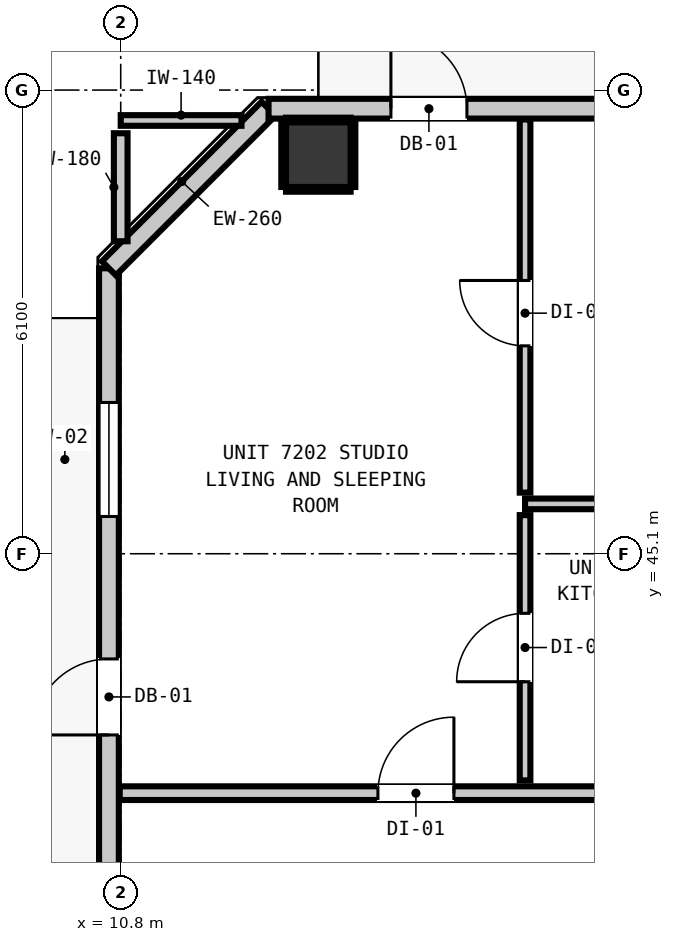
"""IFC4 building model, lengths in metres.
Left out: names, types, materials, properties, quantities, classifications, styles, units other than length and angle.
Written with IfcOpenShell. Run it as: python <this file> out.ifc"""

import sys

from ifc_helpers import new_model, si_unit, direction, frame, frame_2d, origin, origin_2d, place, context, subcontext, project, spatial, rectangle, extrude, element, fill, save


model = new_model("IFC4")
c1 = context("Model", 3, precision=1e-05, world=origin(), true_north=direction((0.0, 1.0)))
c2 = subcontext(c1, "Body", "Model", "MODEL_VIEW")
j1 = project(units=[si_unit("LENGTHUNIT", "METRE"), si_unit("PLANEANGLEUNIT", "RADIAN")], contexts=[c1])
p1 = place(None, origin())
s1 = spatial("IfcSite", under=j1, at=p1, CompositionType="ELEMENT")
p2 = place(p1, origin())
s2 = spatial("IfcBuilding", under=s1, at=p2, CompositionType="ELEMENT")
p3 = place(p2, frame((0.0, 0.0, 247.88)))
s3 = spatial("IfcBuildingStorey", under=s2, at=p3, CompositionType="ELEMENT", Elevation=247.88)
p4 = place(p3, frame((13.4, 50.35, 0.0), z_axis=(0.0, 0.0, 1.0), x_axis=(1.0, 0.0, 0.0)))
e1 = element("IfcColumn", 1, at=p4, inside=s3, PredefinedType="COLUMN", context=c2, shape_type="SweptSolid", body=[
    extrude(rectangle(XDim=0.85, YDim=0.85, at=origin_2d()), origin(), (0.0, 0.0, 1.0), 2.9),
])
p5 = place(p3, frame((10.645, 18.545, 0.0), z_axis=(0.0, 0.0, 1.0), x_axis=(0.0, 1.0, 0.0)))
e2 = element("IfcWall", 2, at=p5, inside=s3, PredefinedType="STANDARD", context=c2, shape_type="SweptSolid", body=[
    extrude(rectangle(XDim=30.31, YDim=0.26, at=frame_2d((15.155, 0.0))), origin(), (0.0, 0.0, 1.0), 2.9),
])
p6 = place(p5, frame((24.171, 0.0, 0.0)))
e3 = element("IfcOpeningElement", 3, at=p6, cuts=e2, PredefinedType="OPENING", context=c2, shape_type="SweptSolid", body=[
    extrude(rectangle(XDim=1.0, YDim=2.15, at=frame_2d((0.5, 1.075))), frame((0.0, 0.14, 0.0), z_axis=(0.0, -1.0, 0.0), x_axis=(1.0, 0.0, 0.0)), (0.0, 0.0, 1.0), 0.28),
])
p7 = place(p5, frame((27.045, 0.0, 0.85)))
e4 = element("IfcOpeningElement", 4, at=p7, cuts=e2, PredefinedType="OPENING", context=c2, shape_type="SweptSolid", body=[
    extrude(rectangle(XDim=1.5, YDim=1.8, at=frame_2d((0.75, 0.9))), frame((0.0, 0.14, 0.0), z_axis=(0.0, -1.0, 0.0), x_axis=(1.0, 0.0, 0.0)), (0.0, 0.0, 1.0), 0.28),
])
p8 = place(p3, frame((10.645, 48.855, 0.0), z_axis=(0.0, 0.0, 1.0), x_axis=(0.707106781187, 0.707106781187, 0.0)))
e5 = element("IfcWall", 5, at=p8, inside=s3, PredefinedType="STANDARD", context=c2, shape_type="SweptSolid", body=[
    extrude(rectangle(XDim=2.97, YDim=0.26, at=frame_2d((1.485, 0.0))), origin(), (0.0, 0.0, 1.0), 2.9),
])
p9 = place(p3, frame((12.745, 50.955, 0.0), z_axis=(0.0, 0.0, 1.0), x_axis=(1.0, 0.0, 0.0)))
e6 = element("IfcWall", 6, at=p9, inside=s3, PredefinedType="STANDARD", context=c2, shape_type="SweptSolid", body=[
    extrude(rectangle(XDim=32.71, YDim=0.26, at=frame_2d((16.355, 0.0))), origin(), (0.0, 0.0, 1.0), 2.9),
])
p10 = place(p9, frame((1.61, 0.0, 0.0)))
e7 = element("IfcOpeningElement", 7, at=p10, cuts=e6, PredefinedType="OPENING", context=c2, shape_type="SweptSolid", body=[
    extrude(rectangle(XDim=1.0, YDim=2.15, at=frame_2d((0.5, 1.075))), frame((0.0, 0.14, 0.0), z_axis=(0.0, -1.0, 0.0), x_axis=(1.0, 0.0, 0.0)), (0.0, 0.0, 1.0), 0.28),
])
p11 = place(p9, frame((9.328, 0.0, 0.85)))
e8 = element("IfcOpeningElement", 8, at=p11, cuts=e6, PredefinedType="OPENING", context=c2, shape_type="SweptSolid", body=[
    extrude(rectangle(XDim=1.5, YDim=1.8, at=frame_2d((0.75, 0.9))), frame((0.0, 0.14, 0.0), z_axis=(0.0, -1.0, 0.0), x_axis=(1.0, 0.0, 0.0)), (0.0, 0.0, 1.0), 0.28),
])
p12 = place(p9, frame((17.29, 0.0, 0.85)))
e9 = element("IfcOpeningElement", 9, at=p12, cuts=e6, PredefinedType="OPENING", context=c2, shape_type="SweptSolid", body=[
    extrude(rectangle(XDim=1.5, YDim=1.8, at=frame_2d((0.75, 0.9))), frame((0.0, 0.14, 0.0), z_axis=(0.0, -1.0, 0.0), x_axis=(1.0, 0.0, 0.0)), (0.0, 0.0, 1.0), 0.28),
])
p13 = place(p9, frame((27.117, 0.0, 0.85)))
e10 = element("IfcOpeningElement", 10, at=p13, cuts=e6, PredefinedType="OPENING", context=c2, shape_type="SweptSolid", body=[
    extrude(rectangle(XDim=1.5, YDim=1.8, at=frame_2d((0.75, 0.9))), frame((0.0, 0.14, 0.0), z_axis=(0.0, -1.0, 0.0), x_axis=(1.0, 0.0, 0.0)), (0.0, 0.0, 1.0), 0.28),
])
p14 = place(p3, frame((10.787, 41.95, 0.0), z_axis=(0.0, 0.0, 1.0), x_axis=(1.0, 0.0, 0.0)))
e11 = element("IfcWall", 11, at=p14, inside=s3, PredefinedType="PARTITIONING", context=c2, shape_type="SweptSolid", body=[
    extrude(rectangle(XDim=36.626, YDim=0.18, at=frame_2d((18.313, 0.0))), origin(), (0.0, 0.0, 1.0), 2.9),
])
p15 = place(p14, frame((3.397, 0.0, 0.0)))
e12 = element("IfcOpeningElement", 12, at=p15, cuts=e11, PredefinedType="OPENING", context=c2, shape_type="SweptSolid", body=[
    extrude(rectangle(XDim=1.0, YDim=2.15, at=frame_2d((0.5, 1.075))), frame((0.0, 0.1, 0.0), z_axis=(0.0, -1.0, 0.0), x_axis=(1.0, 0.0, 0.0)), (0.0, 0.0, 1.0), 0.2),
])
p16 = place(p14, frame((10.773, 0.0, 0.0)))
e13 = element("IfcOpeningElement", 13, at=p16, cuts=e11, PredefinedType="OPENING", context=c2, shape_type="SweptSolid", body=[
    extrude(rectangle(XDim=1.0, YDim=2.15, at=frame_2d((0.5, 1.075))), frame((0.0, 0.1, 0.0), z_axis=(0.0, -1.0, 0.0), x_axis=(1.0, 0.0, 0.0)), (0.0, 0.0, 1.0), 0.2),
])
p17 = place(p14, frame((19.136, 0.0, 0.0)))
e14 = element("IfcOpeningElement", 14, at=p17, cuts=e11, PredefinedType="OPENING", context=c2, shape_type="SweptSolid", body=[
    extrude(rectangle(XDim=1.0, YDim=2.15, at=frame_2d((0.5, 1.075))), frame((0.0, 0.1, 0.0), z_axis=(0.0, -1.0, 0.0), x_axis=(1.0, 0.0, 0.0)), (0.0, 0.0, 1.0), 0.2),
])
p18 = place(p14, frame((28.323, 0.0, 0.0)))
e15 = element("IfcOpeningElement", 15, at=p18, cuts=e11, PredefinedType="OPENING", context=c2, shape_type="SweptSolid", body=[
    extrude(rectangle(XDim=1.0, YDim=2.15, at=frame_2d((0.5, 1.075))), frame((0.0, 0.1, 0.0), z_axis=(0.0, -1.0, 0.0), x_axis=(1.0, 0.0, 0.0)), (0.0, 0.0, 1.0), 0.2),
])
p19 = place(p3, frame((16.12, 45.756, 0.0), z_axis=(0.0, 0.0, 1.0), x_axis=(1.0, 0.0, 0.0)))
e16 = element("IfcWall", 16, at=p19, inside=s3, PredefinedType="PARTITIONING", context=c2, shape_type="SweptSolid", body=[
    extrude(rectangle(XDim=3.0, YDim=0.14, at=frame_2d((1.5, 0.0))), origin(), (0.0, 0.0, 1.0), 2.9),
])
p20 = place(p3, frame((10.8, 50.8, 0.0), z_axis=(0.0, 0.0, 1.0), x_axis=(1.0, 0.0, 0.0)))
e17 = element("IfcWall", 17, at=p20, inside=s3, PredefinedType="PARTITIONING", context=c2, shape_type="SweptSolid", body=[
    extrude(rectangle(XDim=1.589, YDim=0.14, at=frame_2d((0.794, 0.0))), origin(), (0.0, 0.0, 1.0), 2.9),
])
p21 = place(p3, frame((10.8, 49.211, 0.0), z_axis=(0.0, 0.0, 1.0), x_axis=(0.0, 1.0, 0.0)))
e18 = element("IfcWall", 18, at=p21, inside=s3, PredefinedType="PARTITIONING", context=c2, shape_type="SweptSolid", body=[
    extrude(rectangle(XDim=1.421, YDim=0.18, at=frame_2d((0.71, 0.0))), origin(), (0.0, 0.0, 1.0), 2.9),
])
p22 = place(p3, frame((16.12, 42.118, 0.0), z_axis=(0.0, 0.0, 1.0), x_axis=(0.0, 1.0, 0.0)))
e19 = element("IfcWall", 19, at=p22, inside=s3, PredefinedType="PARTITIONING", context=c2, shape_type="SweptSolid", body=[
    extrude(rectangle(XDim=3.49, YDim=0.14, at=frame_2d((1.745, 0.0))), origin(), (0.0, 0.0, 1.0), 2.9),
])
p23 = place(p22, frame((1.298, 0.0, 0.0)))
e20 = element("IfcOpeningElement", 20, at=p23, cuts=e19, PredefinedType="OPENING", context=c2, shape_type="SweptSolid", body=[
    extrude(rectangle(XDim=0.9, YDim=2.1, at=frame_2d((0.45, 1.05))), frame((0.0, 0.08, 0.0), z_axis=(0.0, -1.0, 0.0), x_axis=(1.0, 0.0, 0.0)), (0.0, 0.0, 1.0), 0.16),
])
p24 = place(p3, frame((16.12, 45.904, 0.0), z_axis=(0.0, 0.0, 1.0), x_axis=(0.0, 1.0, 0.0)))
e21 = element("IfcWall", 21, at=p24, inside=s3, PredefinedType="PARTITIONING", context=c2, shape_type="SweptSolid", body=[
    extrude(rectangle(XDim=4.909, YDim=0.14, at=frame_2d((2.455, 0.0))), origin(), (0.0, 0.0, 1.0), 2.9),
])
p25 = place(p24, frame((1.931, 0.0, 0.0)))
e22 = element("IfcOpeningElement", 22, at=p25, cuts=e21, PredefinedType="OPENING", context=c2, shape_type="SweptSolid", body=[
    extrude(rectangle(XDim=0.86, YDim=2.02, at=frame_2d((0.43, 1.01))), frame((0.0, 0.08, 0.0), z_axis=(0.0, -1.0, 0.0), x_axis=(1.0, 0.0, 0.0)), (0.0, 0.0, 1.0), 0.16),
])
for number, where, z_axis, x_axis in (
    (23, (12.975, 49.893, 0.0), (0.0, 0.0, 1.0), (1.0, 0.0, 0.0)),
    (24, (12.975, 50.807, 0.0), (0.0, 0.0, 1.0), (1.0, 0.0, 0.0)),
):
    element("IfcWall", number, at=place(p3, frame(where, z_axis=z_axis, x_axis=x_axis)), inside=s3, PredefinedType="PARTITIONING", context=c2, shape_type="SweptSolid", body=[
        extrude(rectangle(XDim=0.85, YDim=0.06, at=frame_2d((0.425, 0.0))), origin(), (0.0, 0.0, 1.0), 1.45),
    ])
for number, where, z_axis, x_axis in (
    (25, (12.943, 49.925, 0.0), (0.0, 0.0, 1.0), (0.0, 1.0, 0.0)),
    (26, (13.857, 49.925, 0.0), (0.0, 0.0, 1.0), (0.0, 1.0, 0.0)),
):
    element("IfcWall", number, at=place(p3, frame(where, z_axis=z_axis, x_axis=x_axis)), inside=s3, PredefinedType="PARTITIONING", context=c2, shape_type="SweptSolid", body=[
        extrude(rectangle(XDim=0.85, YDim=0.06, at=frame_2d((0.425, 0.0))), origin(), (0.0, 0.0, 1.0), 0.905),
    ])
p26 = place(p10, origin())
e27 = element("IfcDoor", 27, at=p26, inside=s3, OperationType="SINGLE_SWING_LEFT", PredefinedType="DOOR", context=c2, shape_type="SweptSolid", body=[
    extrude(rectangle(XDim=1.0, YDim=2.15, at=frame_2d((0.5, 1.075))), frame((0.0, 0.025, 0.0), z_axis=(0.0, -1.0, 0.0), x_axis=(1.0, 0.0, 0.0)), (0.0, 0.0, 1.0), 0.05),
])
fill(e7, e27)
p27 = place(p6, origin())
e28 = element("IfcDoor", 28, at=p27, inside=s3, OperationType="SINGLE_SWING_LEFT", PredefinedType="DOOR", context=c2, shape_type="SweptSolid", body=[
    extrude(rectangle(XDim=1.0, YDim=2.15, at=frame_2d((0.5, 1.075))), frame((0.0, 0.025, 0.0), z_axis=(0.0, -1.0, 0.0), x_axis=(1.0, 0.0, 0.0)), (0.0, 0.0, 1.0), 0.05),
])
fill(e3, e28)
p28 = place(p7, origin())
e29 = element("IfcWindow", 29, at=p28, inside=s3, PartitioningType="SINGLE_PANEL", PredefinedType="WINDOW", context=c2, shape_type="SweptSolid", body=[
    extrude(rectangle(XDim=1.5, YDim=1.8, at=frame_2d((0.75, 0.9))), frame((0.0, 0.03, 0.0), z_axis=(0.0, -1.0, 0.0), x_axis=(1.0, 0.0, 0.0)), (0.0, 0.0, 1.0), 0.06),
])
fill(e4, e29)
p29 = place(p15, origin())
e30 = element("IfcDoor", 30, at=p29, inside=s3, OperationType="SINGLE_SWING_RIGHT", PredefinedType="DOOR", context=c2, shape_type="SweptSolid", body=[
    extrude(rectangle(XDim=1.0, YDim=2.15, at=frame_2d((0.5, 1.075))), frame((0.0, 0.025, 0.0), z_axis=(0.0, -1.0, 0.0), x_axis=(1.0, 0.0, 0.0)), (0.0, 0.0, 1.0), 0.05),
])
fill(e12, e30)
p30 = place(p23, origin())
e31 = element("IfcDoor", 31, at=p30, inside=s3, OperationType="SINGLE_SWING_LEFT", PredefinedType="DOOR", context=c2, shape_type="SweptSolid", body=[
    extrude(rectangle(XDim=0.9, YDim=2.1, at=frame_2d((0.45, 1.05))), frame((0.0, 0.025, 0.0), z_axis=(0.0, -1.0, 0.0), x_axis=(1.0, 0.0, 0.0)), (0.0, 0.0, 1.0), 0.05),
])
fill(e20, e31)
p31 = place(p25, origin())
e32 = element("IfcDoor", 32, at=p31, inside=s3, OperationType="SINGLE_SWING_RIGHT", PredefinedType="DOOR", context=c2, shape_type="SweptSolid", body=[
    extrude(rectangle(XDim=0.86, YDim=2.02, at=frame_2d((0.43, 1.01))), frame((0.0, 0.025, 0.0), z_axis=(0.0, -1.0, 0.0), x_axis=(1.0, 0.0, 0.0)), (0.0, 0.0, 1.0), 0.05),
])
fill(e22, e32)
save(model, sys.argv[1])
